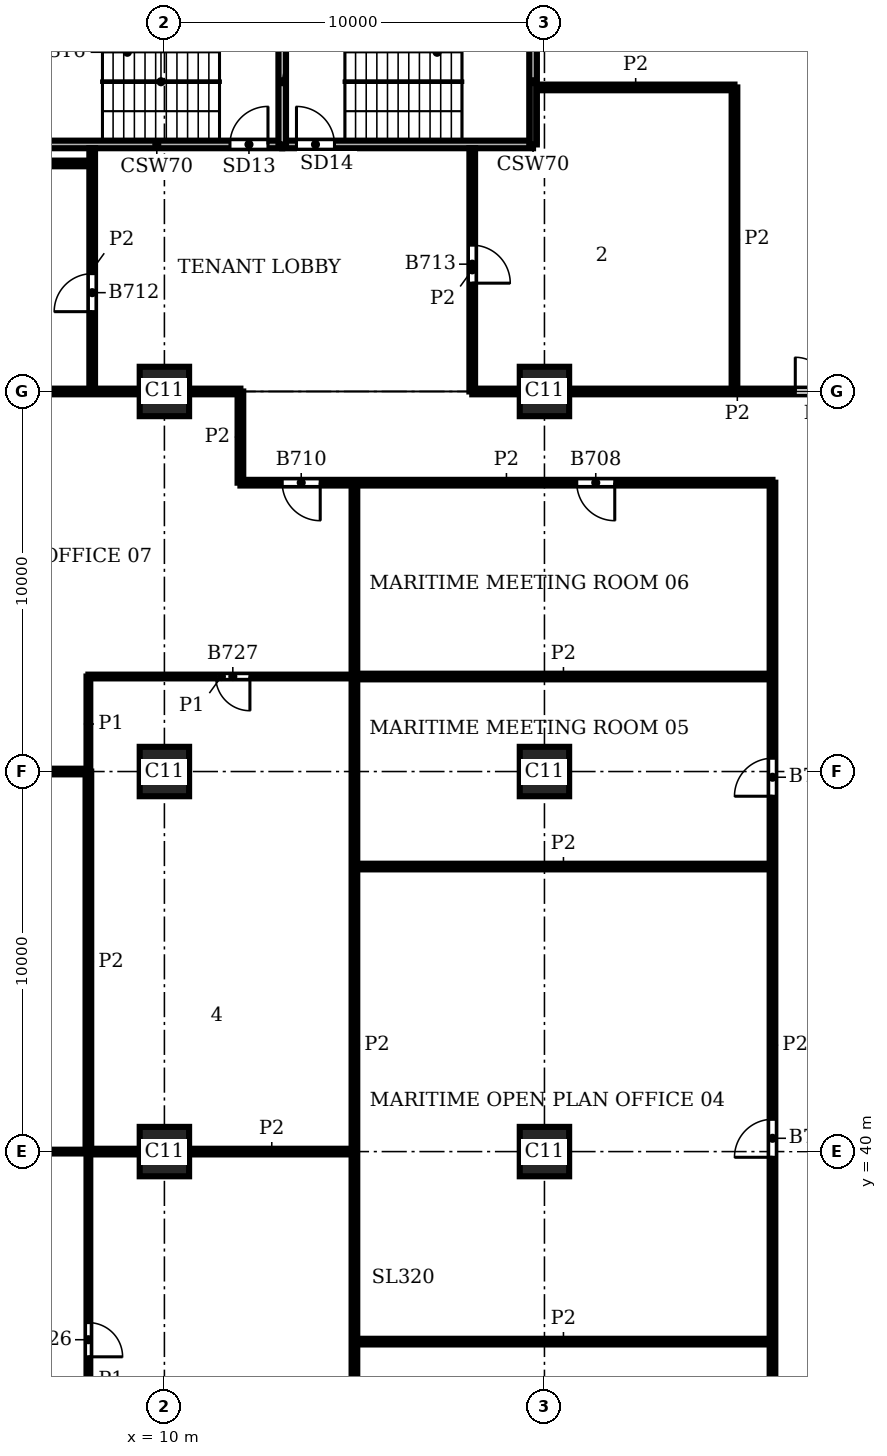
"""IFC4 building model, lengths in metres.
Left out: names, types, materials, properties, quantities, classifications, styles, units other than length and angle.
Written with IfcOpenShell. Run it as: python <this file> out.ifc"""

import sys

from ifc_helpers import new_model, si_unit, direction, frame, frame_2d, origin, origin_2d, place, context, subcontext, project, spatial, rectangle, extrude, element, fill, save


model = new_model("IFC4")
c1 = context("Model", 3, precision=1e-05, world=origin(), true_north=direction((0.0, 1.0)))
c2 = subcontext(c1, "Body", "Model", "MODEL_VIEW")
j1 = project(units=[si_unit("LENGTHUNIT", "METRE"), si_unit("PLANEANGLEUNIT", "RADIAN")], contexts=[c1])
p1 = place(None, origin())
s1 = spatial("IfcSite", under=j1, at=p1, CompositionType="ELEMENT")
p2 = place(p1, origin())
s2 = spatial("IfcBuilding", under=s1, at=p2, CompositionType="ELEMENT")
p3 = place(p2, frame((0.0, 0.0, 201.9)))
s3 = spatial("IfcBuildingStorey", under=s2, at=p3, CompositionType="ELEMENT", Elevation=201.9)
for number, where, z_axis, x_axis in (
    (1, (10.0, 40.0, 0.0), (0.0, 0.0, 1.0), (1.0, 0.0, 0.0)),
    (2, (10.0, 50.0, 0.0), (0.0, 0.0, 1.0), (1.0, 0.0, 0.0)),
    (3, (10.0, 60.0, 0.0), (0.0, 0.0, 1.0), (1.0, 0.0, 0.0)),
    (4, (20.0, 40.0, 0.0), (0.0, 0.0, 1.0), (1.0, 0.0, 0.0)),
    (5, (20.0, 50.0, 0.0), (0.0, 0.0, 1.0), (1.0, 0.0, 0.0)),
    (6, (20.0, 60.0, 0.0), (0.0, 0.0, 1.0), (1.0, 0.0, 0.0)),
):
    element("IfcColumn", number, at=place(p3, frame(where, z_axis=z_axis, x_axis=x_axis)), inside=s3, PredefinedType="COLUMN", context=c2, shape_type="SweptSolid", body=[
        extrude(rectangle(XDim=1.3, YDim=1.3, at=origin_2d()), origin(), (0.0, 0.0, 1.0), 3.9),
    ])
p4 = place(p3, frame((29.357, 66.434, 0.0), z_axis=(0.0, 0.0, 1.0), x_axis=(-0.555541552266, 0.831488775454, 0.0)))
e7 = element("IfcWall", 7, at=p4, inside=s3, PredefinedType="SOLIDWALL", context=c2, shape_type="SweptSolid", body=[
    extrude(rectangle(XDim=4.753, YDim=0.4, at=frame_2d((2.376, 0.0))), origin(), (0.0, 0.0, 1.0), 3.9),
])
p5 = place(p4, frame((0.226, 0.0, 0.9)))
e8 = element("IfcOpeningElement", 8, at=p5, cuts=e7, PredefinedType="OPENING", context=c2, shape_type="SweptSolid", body=[
    extrude(rectangle(XDim=4.3, YDim=2.35, at=frame_2d((2.15, 1.175))), frame((0.0, 0.21, 0.0), z_axis=(0.0, -1.0, 0.0), x_axis=(1.0, 0.0, 0.0)), (0.0, 0.0, 1.0), 0.42),
])
p6 = place(p3, frame((6.5, 66.5, 0.0), z_axis=(0.0, 0.0, 1.0), x_axis=(1.0, 0.0, 0.0)))
e9 = element("IfcWall", 9, at=p6, inside=s3, PredefinedType="SHEAR", context=c2, shape_type="SweptSolid", body=[
    extrude(rectangle(XDim=6.6, YDim=0.2, at=frame_2d((3.3, 0.0))), origin(), (0.0, 0.0, 1.0), 3.58),
])
p7 = place(p6, frame((5.225, 0.0, 0.0)))
e10 = element("IfcOpeningElement", 10, at=p7, cuts=e9, PredefinedType="OPENING", context=c2, shape_type="SweptSolid", body=[
    extrude(rectangle(XDim=1.0, YDim=2.1, at=frame_2d((0.5, 1.05))), frame((0.0, 0.11, 0.0), z_axis=(0.0, -1.0, 0.0), x_axis=(1.0, 0.0, 0.0)), (0.0, 0.0, 1.0), 0.22),
])
p8 = place(p3, frame((13.1, 66.5, 0.0), z_axis=(0.0, 0.0, 1.0), x_axis=(1.0, 0.0, 0.0)))
e11 = element("IfcWall", 11, at=p8, inside=s3, PredefinedType="SHEAR", context=c2, shape_type="SweptSolid", body=[
    extrude(rectangle(XDim=6.6, YDim=0.2, at=frame_2d((3.3, 0.0))), origin(), (0.0, 0.0, 1.0), 3.58),
])
p9 = place(p8, frame((0.375, 0.0, 0.0)))
e12 = element("IfcOpeningElement", 12, at=p9, cuts=e11, PredefinedType="OPENING", context=c2, shape_type="SweptSolid", body=[
    extrude(rectangle(XDim=1.0, YDim=2.1, at=frame_2d((0.5, 1.05))), frame((0.0, 0.11, 0.0), z_axis=(0.0, -1.0, 0.0), x_axis=(1.0, 0.0, 0.0)), (0.0, 0.0, 1.0), 0.22),
])
for number, where, z_axis, x_axis in (
    (13, (13.1, 66.5, 0.0), (0.0, 0.0, 1.0), (0.0, 1.0, 0.0)),
    (14, (19.7, 66.5, 0.0), (0.0, 0.0, 1.0), (0.0, 1.0, 0.0)),
):
    element("IfcWall", number, at=place(p3, frame(where, z_axis=z_axis, x_axis=x_axis)), inside=s3, PredefinedType="SHEAR", context=c2, shape_type="SweptSolid", body=[
        extrude(rectangle(XDim=3.3, YDim=0.2, at=frame_2d((1.65, 0.0))), origin(), (0.0, 0.0, 1.0), 3.58),
    ])
p10 = place(p3, frame((8.0, 28.0, 0.0), z_axis=(0.0, 0.0, 1.0), x_axis=(0.0, 1.0, 0.0)))
e15 = element("IfcWall", 15, at=p10, inside=s3, PredefinedType="PARTITIONING", context=c2, shape_type="SweptSolid", body=[
    extrude(rectangle(XDim=12.0, YDim=0.1, at=frame_2d((6.0, 0.0))), origin(), (0.0, 0.0, 1.0), 3.58),
])
p11 = place(p10, frame((6.6, 0.0, 0.0)))
e16 = element("IfcOpeningElement", 16, at=p11, cuts=e15, PredefinedType="OPENING", context=c2, shape_type="SweptSolid", body=[
    extrude(rectangle(XDim=0.9, YDim=2.1, at=frame_2d((0.45, 1.05))), frame((0.0, 0.06, 0.0), z_axis=(0.0, -1.0, 0.0), x_axis=(1.0, 0.0, 0.0)), (0.0, 0.0, 1.0), 0.12),
])
p12 = place(p3, frame((8.0, 50.0, 0.0), z_axis=(0.0, 0.0, 1.0), x_axis=(0.0, 1.0, 0.0)))
e17 = element("IfcWall", 17, at=p12, inside=s3, PredefinedType="PARTITIONING", context=c2, shape_type="SweptSolid", body=[
    extrude(rectangle(XDim=2.5, YDim=0.1, at=frame_2d((1.25, 0.0))), origin(), (0.0, 0.0, 1.0), 3.58),
])
p13 = place(p3, frame((0.45, 40.0, 0.0), z_axis=(0.0, 0.0, 1.0), x_axis=(1.0, 0.0, 0.0)))
e18 = element("IfcWall", 18, at=p13, inside=s3, PredefinedType="PARTITIONING", context=c2, shape_type="SweptSolid", body=[
    extrude(rectangle(XDim=7.55, YDim=0.1, at=frame_2d((3.775, 0.0))), origin(), (0.0, 0.0, 1.0), 3.58),
])
p14 = place(p13, frame((2.975, 0.0, 0.0)))
e19 = element("IfcOpeningElement", 19, at=p14, cuts=e18, PredefinedType="OPENING", context=c2, shape_type="SweptSolid", body=[
    extrude(rectangle(XDim=0.95, YDim=2.1, at=frame_2d((0.475, 1.05))), frame((0.0, 0.06, 0.0), z_axis=(0.0, -1.0, 0.0), x_axis=(1.0, 0.0, 0.0)), (0.0, 0.0, 1.0), 0.12),
])
p15 = place(p3, frame((8.0, 52.5, 0.0), z_axis=(0.0, 0.0, 1.0), x_axis=(1.0, 0.0, 0.0)))
e20 = element("IfcWall", 20, at=p15, inside=s3, PredefinedType="PARTITIONING", context=c2, shape_type="SweptSolid", body=[
    extrude(rectangle(XDim=7.0, YDim=0.1, at=frame_2d((3.5, 0.0))), origin(), (0.0, 0.0, 1.0), 3.58),
])
p16 = place(p15, frame((3.35, 0.0, 0.0)))
e21 = element("IfcOpeningElement", 21, at=p16, cuts=e20, PredefinedType="OPENING", context=c2, shape_type="SweptSolid", body=[
    extrude(rectangle(XDim=0.9, YDim=2.1, at=frame_2d((0.45, 1.05))), frame((0.0, 0.06, 0.0), z_axis=(0.0, -1.0, 0.0), x_axis=(1.0, 0.0, 0.0)), (0.0, 0.0, 1.0), 0.12),
])
p17 = place(p3, frame((8.0, 40.0, 0.0), z_axis=(0.0, 0.0, 1.0), x_axis=(0.0, 1.0, 0.0)))
e22 = element("IfcWall", 22, at=p17, inside=s3, PredefinedType="PARTITIONING", context=c2, shape_type="SweptSolid", body=[
    extrude(rectangle(XDim=10.0, YDim=0.15, at=frame_2d((5.0, 0.0))), origin(), (0.0, 0.0, 1.0), 3.58),
])
p18 = place(p3, frame((8.1, 60.0, 0.0), z_axis=(0.0, 0.0, 1.0), x_axis=(0.0, 1.0, 0.0)))
e23 = element("IfcWall", 23, at=p18, inside=s3, PredefinedType="PARTITIONING", context=c2, shape_type="SweptSolid", body=[
    extrude(rectangle(XDim=6.4, YDim=0.15, at=frame_2d((3.2, 0.0))), origin(), (0.0, 0.0, 1.0), 3.58),
])
p19 = place(p18, frame((2.1, 0.0, 0.0)))
e24 = element("IfcOpeningElement", 24, at=p19, cuts=e23, PredefinedType="OPENING", context=c2, shape_type="SweptSolid", body=[
    extrude(rectangle(XDim=1.0, YDim=2.1, at=frame_2d((0.5, 1.05))), frame((0.0, 0.085, 0.0), z_axis=(0.0, -1.0, 0.0), x_axis=(1.0, 0.0, 0.0)), (0.0, 0.0, 1.0), 0.17),
])
p20 = place(p3, frame((12.0, 57.6, 0.0), z_axis=(0.0, 0.0, 1.0), x_axis=(0.0, 1.0, 0.0)))
e25 = element("IfcWall", 25, at=p20, inside=s3, PredefinedType="PARTITIONING", context=c2, shape_type="SweptSolid", body=[
    extrude(rectangle(XDim=2.4, YDim=0.15, at=frame_2d((1.2, 0.0))), origin(), (0.0, 0.0, 1.0), 3.58),
])
p21 = place(p3, frame((15.0, 28.0, 0.0), z_axis=(0.0, 0.0, 1.0), x_axis=(0.0, 1.0, 0.0)))
e26 = element("IfcWall", 26, at=p21, inside=s3, PredefinedType="PARTITIONING", context=c2, shape_type="SweptSolid", body=[
    extrude(rectangle(XDim=29.6, YDim=0.15, at=frame_2d((14.8, 0.0))), origin(), (0.0, 0.0, 1.0), 3.58),
])
p22 = place(p3, frame((18.1, 60.0, 0.0), z_axis=(0.0, 0.0, 1.0), x_axis=(0.0, 1.0, 0.0)))
e27 = element("IfcWall", 27, at=p22, inside=s3, PredefinedType="PARTITIONING", context=c2, shape_type="SweptSolid", body=[
    extrude(rectangle(XDim=6.4, YDim=0.15, at=frame_2d((3.2, 0.0))), origin(), (0.0, 0.0, 1.0), 3.58),
])
p23 = place(p22, frame((2.85, 0.0, 0.0)))
e28 = element("IfcOpeningElement", 28, at=p23, cuts=e27, PredefinedType="OPENING", context=c2, shape_type="SweptSolid", body=[
    extrude(rectangle(XDim=1.0, YDim=2.1, at=frame_2d((0.5, 1.05))), frame((0.0, 0.085, 0.0), z_axis=(0.0, -1.0, 0.0), x_axis=(1.0, 0.0, 0.0)), (0.0, 0.0, 1.0), 0.17),
])
p24 = place(p3, frame((25.0, 60.0, 0.0), z_axis=(0.0, 0.0, 1.0), x_axis=(0.0, 1.0, 0.0)))
e29 = element("IfcWall", 29, at=p24, inside=s3, PredefinedType="PARTITIONING", context=c2, shape_type="SweptSolid", body=[
    extrude(rectangle(XDim=8.0, YDim=0.15, at=frame_2d((4.0, 0.0))), origin(), (0.0, 0.0, 1.0), 3.58),
])
p25 = place(p3, frame((26.0, 28.0, 0.0), z_axis=(0.0, 0.0, 1.0), x_axis=(0.0, 1.0, 0.0)))
e30 = element("IfcWall", 30, at=p25, inside=s3, PredefinedType="PARTITIONING", context=c2, shape_type="SweptSolid", body=[
    extrude(rectangle(XDim=29.6, YDim=0.15, at=frame_2d((14.8, 0.0))), origin(), (0.0, 0.0, 1.0), 3.58),
])
p26 = place(p25, frame((3.6, 0.0, 0.0)))
e31 = element("IfcOpeningElement", 31, at=p26, cuts=e30, PredefinedType="OPENING", context=c2, shape_type="SweptSolid", body=[
    extrude(rectangle(XDim=1.0, YDim=2.1, at=frame_2d((0.5, 1.05))), frame((0.0, 0.085, 0.0), z_axis=(0.0, -1.0, 0.0), x_axis=(1.0, 0.0, 0.0)), (0.0, 0.0, 1.0), 0.17),
])
p27 = place(p25, frame((11.85, 0.0, 0.0)))
e32 = element("IfcOpeningElement", 32, at=p27, cuts=e30, PredefinedType="OPENING", context=c2, shape_type="SweptSolid", body=[
    extrude(rectangle(XDim=1.0, YDim=2.1, at=frame_2d((0.5, 1.05))), frame((0.0, 0.085, 0.0), z_axis=(0.0, -1.0, 0.0), x_axis=(1.0, 0.0, 0.0)), (0.0, 0.0, 1.0), 0.17),
])
p28 = place(p25, frame((21.35, 0.0, 0.0)))
e33 = element("IfcOpeningElement", 33, at=p28, cuts=e30, PredefinedType="OPENING", context=c2, shape_type="SweptSolid", body=[
    extrude(rectangle(XDim=1.0, YDim=2.1, at=frame_2d((0.5, 1.05))), frame((0.0, 0.085, 0.0), z_axis=(0.0, -1.0, 0.0), x_axis=(1.0, 0.0, 0.0)), (0.0, 0.0, 1.0), 0.17),
])
p29 = place(p3, frame((15.0, 35.0, 0.0), z_axis=(0.0, 0.0, 1.0), x_axis=(1.0, 0.0, 0.0)))
e34 = element("IfcWall", 34, at=p29, inside=s3, PredefinedType="PARTITIONING", context=c2, shape_type="SweptSolid", body=[
    extrude(rectangle(XDim=11.0, YDim=0.15, at=frame_2d((5.5, 0.0))), origin(), (0.0, 0.0, 1.0), 3.58),
])
p30 = place(p3, frame((8.0, 40.0, 0.0), z_axis=(0.0, 0.0, 1.0), x_axis=(1.0, 0.0, 0.0)))
e35 = element("IfcWall", 35, at=p30, inside=s3, PredefinedType="PARTITIONING", context=c2, shape_type="SweptSolid", body=[
    extrude(rectangle(XDim=1.35, YDim=0.15, at=frame_2d((0.675, 0.0))), origin(), (0.0, 0.0, 1.0), 3.58),
])
p31 = place(p3, frame((10.65, 40.0, 0.0), z_axis=(0.0, 0.0, 1.0), x_axis=(1.0, 0.0, 0.0)))
e36 = element("IfcWall", 36, at=p31, inside=s3, PredefinedType="PARTITIONING", context=c2, shape_type="SweptSolid", body=[
    extrude(rectangle(XDim=4.35, YDim=0.15, at=frame_2d((2.175, 0.0))), origin(), (0.0, 0.0, 1.0), 3.58),
])
p32 = place(p3, frame((15.0, 47.5, 0.0), z_axis=(0.0, 0.0, 1.0), x_axis=(1.0, 0.0, 0.0)))
e37 = element("IfcWall", 37, at=p32, inside=s3, PredefinedType="PARTITIONING", context=c2, shape_type="SweptSolid", body=[
    extrude(rectangle(XDim=11.0, YDim=0.15, at=frame_2d((5.5, 0.0))), origin(), (0.0, 0.0, 1.0), 3.58),
])
p33 = place(p3, frame((0.45, 50.0, 0.0), z_axis=(0.0, 0.0, 1.0), x_axis=(1.0, 0.0, 0.0)))
e38 = element("IfcWall", 38, at=p33, inside=s3, PredefinedType="PARTITIONING", context=c2, shape_type="SweptSolid", body=[
    extrude(rectangle(XDim=7.55, YDim=0.15, at=frame_2d((3.775, 0.0))), origin(), (0.0, 0.0, 1.0), 3.58),
])
p34 = place(p3, frame((15.0, 52.5, 0.0), z_axis=(0.0, 0.0, 1.0), x_axis=(1.0, 0.0, 0.0)))
e39 = element("IfcWall", 39, at=p34, inside=s3, PredefinedType="PARTITIONING", context=c2, shape_type="SweptSolid", body=[
    extrude(rectangle(XDim=11.0, YDim=0.15, at=frame_2d((5.5, 0.0))), origin(), (0.0, 0.0, 1.0), 3.58),
])
p35 = place(p3, frame((12.0, 57.6, 0.0), z_axis=(0.0, 0.0, 1.0), x_axis=(1.0, 0.0, 0.0)))
e40 = element("IfcWall", 40, at=p35, inside=s3, PredefinedType="PARTITIONING", context=c2, shape_type="SweptSolid", body=[
    extrude(rectangle(XDim=14.0, YDim=0.15, at=frame_2d((7.0, 0.0))), origin(), (0.0, 0.0, 1.0), 3.58),
])
p36 = place(p35, frame((8.85, 0.0, 0.0)))
e41 = element("IfcOpeningElement", 41, at=p36, cuts=e40, PredefinedType="OPENING", context=c2, shape_type="SweptSolid", body=[
    extrude(rectangle(XDim=1.0, YDim=2.1, at=frame_2d((0.5, 1.05))), frame((0.0, 0.085, 0.0), z_axis=(0.0, -1.0, 0.0), x_axis=(1.0, 0.0, 0.0)), (0.0, 0.0, 1.0), 0.17),
])
p37 = place(p35, frame((1.1, 0.0, 0.0)))
e42 = element("IfcOpeningElement", 42, at=p37, cuts=e40, PredefinedType="OPENING", context=c2, shape_type="SweptSolid", body=[
    extrude(rectangle(XDim=1.0, YDim=2.1, at=frame_2d((0.5, 1.05))), frame((0.0, 0.085, 0.0), z_axis=(0.0, -1.0, 0.0), x_axis=(1.0, 0.0, 0.0)), (0.0, 0.0, 1.0), 0.17),
])
p38 = place(p3, frame((0.5, 60.0, 0.0), z_axis=(0.0, 0.0, 1.0), x_axis=(1.0, 0.0, 0.0)))
e43 = element("IfcWall", 43, at=p38, inside=s3, PredefinedType="PARTITIONING", context=c2, shape_type="SweptSolid", body=[
    extrude(rectangle(XDim=8.85, YDim=0.15, at=frame_2d((4.425, 0.0))), origin(), (0.0, 0.0, 1.0), 3.58),
])
p39 = place(p3, frame((10.65, 60.0, 0.0), z_axis=(0.0, 0.0, 1.0), x_axis=(1.0, 0.0, 0.0)))
e44 = element("IfcWall", 44, at=p39, inside=s3, PredefinedType="PARTITIONING", context=c2, shape_type="SweptSolid", body=[
    extrude(rectangle(XDim=1.35, YDim=0.15, at=frame_2d((0.675, 0.0))), origin(), (0.0, 0.0, 1.0), 3.58),
])
p40 = place(p3, frame((18.1, 60.0, 0.0), z_axis=(0.0, 0.0, 1.0), x_axis=(1.0, 0.0, 0.0)))
e45 = element("IfcWall", 45, at=p40, inside=s3, PredefinedType="PARTITIONING", context=c2, shape_type="SweptSolid", body=[
    extrude(rectangle(XDim=1.25, YDim=0.15, at=frame_2d((0.625, 0.0))), origin(), (0.0, 0.0, 1.0), 3.58),
])
p41 = place(p3, frame((20.65, 60.0, 0.0), z_axis=(0.0, 0.0, 1.0), x_axis=(1.0, 0.0, 0.0)))
e46 = element("IfcWall", 46, at=p41, inside=s3, PredefinedType="PARTITIONING", context=c2, shape_type="SweptSolid", body=[
    extrude(rectangle(XDim=8.85, YDim=0.15, at=frame_2d((4.425, 0.0))), origin(), (0.0, 0.0, 1.0), 3.58),
])
p42 = place(p41, frame((5.95, 0.0, 0.0)))
e47 = element("IfcOpeningElement", 47, at=p42, cuts=e46, PredefinedType="OPENING", context=c2, shape_type="SweptSolid", body=[
    extrude(rectangle(XDim=1.8, YDim=2.1, at=frame_2d((0.9, 1.05))), frame((0.0, 0.085, 0.0), z_axis=(0.0, -1.0, 0.0), x_axis=(1.0, 0.0, 0.0)), (0.0, 0.0, 1.0), 0.17),
])
p43 = place(p3, frame((0.644, 66.0, 0.0), z_axis=(0.0, 0.0, 1.0), x_axis=(1.0, 0.0, 0.0)))
e48 = element("IfcWall", 48, at=p43, inside=s3, PredefinedType="PARTITIONING", context=c2, shape_type="SweptSolid", body=[
    extrude(rectangle(XDim=7.456, YDim=0.15, at=frame_2d((3.728, 0.0))), origin(), (0.0, 0.0, 1.0), 3.58),
])
p44 = place(p3, frame((19.8, 68.0, 0.0), z_axis=(0.0, 0.0, 1.0), x_axis=(1.0, 0.0, 0.0)))
e49 = element("IfcWall", 49, at=p44, inside=s3, PredefinedType="PARTITIONING", context=c2, shape_type="SweptSolid", body=[
    extrude(rectangle(XDim=5.2, YDim=0.15, at=frame_2d((2.6, 0.0))), origin(), (0.0, 0.0, 1.0), 3.58),
])
p45 = place(p5, origin())
e50 = element("IfcWindow", 50, at=p45, inside=s3, PartitioningType="SINGLE_PANEL", PredefinedType="WINDOW", context=c2, shape_type="SweptSolid", body=[
    extrude(rectangle(XDim=4.3, YDim=2.35, at=frame_2d((2.15, 1.175))), frame((0.0, 0.16, 0.0), z_axis=(0.0, -1.0, 0.0), x_axis=(1.0, 0.0, 0.0)), (0.0, 0.0, 1.0), 0.06),
])
fill(e8, e50)
p46 = place(p7, origin())
e51 = element("IfcDoor", 51, at=p46, inside=s3, OperationType="SINGLE_SWING_RIGHT", PredefinedType="DOOR", context=c2, shape_type="SweptSolid", body=[
    extrude(rectangle(XDim=1.0, YDim=2.1, at=frame_2d((0.5, 1.05))), frame((0.0, 0.025, 0.0), z_axis=(0.0, -1.0, 0.0), x_axis=(1.0, 0.0, 0.0)), (0.0, 0.0, 1.0), 0.05),
])
fill(e10, e51)
p47 = place(p9, origin())
e52 = element("IfcDoor", 52, at=p47, inside=s3, OperationType="SINGLE_SWING_LEFT", PredefinedType="DOOR", context=c2, shape_type="SweptSolid", body=[
    extrude(rectangle(XDim=1.0, YDim=2.1, at=frame_2d((0.5, 1.05))), frame((0.0, 0.025, 0.0), z_axis=(0.0, -1.0, 0.0), x_axis=(1.0, 0.0, 0.0)), (0.0, 0.0, 1.0), 0.05),
])
fill(e12, e52)
p48 = place(p27, origin())
e53 = element("IfcDoor", 53, at=p48, inside=s3, OperationType="SINGLE_SWING_LEFT", PredefinedType="DOOR", context=c2, shape_type="SweptSolid", body=[
    extrude(rectangle(XDim=1.0, YDim=2.1, at=frame_2d((0.5, 1.05))), frame((0.0, 0.025, 0.0), z_axis=(0.0, -1.0, 0.0), x_axis=(1.0, 0.0, 0.0)), (0.0, 0.0, 1.0), 0.05),
])
fill(e32, e53)
p49 = place(p28, origin())
e54 = element("IfcDoor", 54, at=p49, inside=s3, OperationType="SINGLE_SWING_LEFT", PredefinedType="DOOR", context=c2, shape_type="SweptSolid", body=[
    extrude(rectangle(XDim=1.0, YDim=2.1, at=frame_2d((0.5, 1.05))), frame((0.0, 0.025, 0.0), z_axis=(0.0, -1.0, 0.0), x_axis=(1.0, 0.0, 0.0)), (0.0, 0.0, 1.0), 0.05),
])
fill(e33, e54)
p50 = place(p36, frame((1.0, 0.0, 0.0), z_axis=(0.0, 0.0, 1.0), x_axis=(-1.0, 0.0, 0.0)))
e55 = element("IfcDoor", 55, at=p50, inside=s3, OperationType="SINGLE_SWING_LEFT", PredefinedType="DOOR", context=c2, shape_type="SweptSolid", body=[
    extrude(rectangle(XDim=1.0, YDim=2.1, at=frame_2d((0.5, 1.05))), frame((0.0, 0.025, 0.0), z_axis=(0.0, -1.0, 0.0), x_axis=(1.0, 0.0, 0.0)), (0.0, 0.0, 1.0), 0.05),
])
fill(e41, e55)
p51 = place(p37, frame((1.0, 0.0, 0.0), z_axis=(0.0, 0.0, 1.0), x_axis=(-1.0, 0.0, 0.0)))
e56 = element("IfcDoor", 56, at=p51, inside=s3, OperationType="SINGLE_SWING_LEFT", PredefinedType="DOOR", context=c2, shape_type="SweptSolid", body=[
    extrude(rectangle(XDim=1.0, YDim=2.1, at=frame_2d((0.5, 1.05))), frame((0.0, 0.025, 0.0), z_axis=(0.0, -1.0, 0.0), x_axis=(1.0, 0.0, 0.0)), (0.0, 0.0, 1.0), 0.05),
])
fill(e42, e56)
p52 = place(p19, origin())
e57 = element("IfcDoor", 57, at=p52, inside=s3, OperationType="SINGLE_SWING_LEFT", PredefinedType="DOOR", context=c2, shape_type="SweptSolid", body=[
    extrude(rectangle(XDim=1.0, YDim=2.1, at=frame_2d((0.5, 1.05))), frame((0.0, 0.025, 0.0), z_axis=(0.0, -1.0, 0.0), x_axis=(1.0, 0.0, 0.0)), (0.0, 0.0, 1.0), 0.05),
])
fill(e24, e57)
p53 = place(p23, frame((1.0, 0.0, 0.0), z_axis=(0.0, 0.0, 1.0), x_axis=(-1.0, 0.0, 0.0)))
e58 = element("IfcDoor", 58, at=p53, inside=s3, OperationType="SINGLE_SWING_RIGHT", PredefinedType="DOOR", context=c2, shape_type="SweptSolid", body=[
    extrude(rectangle(XDim=1.0, YDim=2.1, at=frame_2d((0.5, 1.05))), frame((0.0, 0.025, 0.0), z_axis=(0.0, -1.0, 0.0), x_axis=(1.0, 0.0, 0.0)), (0.0, 0.0, 1.0), 0.05),
])
fill(e28, e58)
p54 = place(p42, origin())
e59 = element("IfcDoor", 59, at=p54, inside=s3, OperationType="DOUBLE_DOOR_SINGLE_SWING", PredefinedType="DOOR", context=c2, shape_type="SweptSolid", body=[
    extrude(rectangle(XDim=1.8, YDim=2.1, at=frame_2d((0.9, 1.05))), frame((0.0, 0.025, 0.0), z_axis=(0.0, -1.0, 0.0), x_axis=(1.0, 0.0, 0.0)), (0.0, 0.0, 1.0), 0.05),
])
fill(e47, e59)
p55 = place(p11, frame((0.9, 0.0, 0.0), z_axis=(0.0, 0.0, 1.0), x_axis=(-1.0, 0.0, 0.0)))
e60 = element("IfcDoor", 60, at=p55, inside=s3, OperationType="SINGLE_SWING_RIGHT", PredefinedType="DOOR", context=c2, shape_type="SweptSolid", body=[
    extrude(rectangle(XDim=0.9, YDim=2.1, at=frame_2d((0.45, 1.05))), frame((0.0, 0.025, 0.0), z_axis=(0.0, -1.0, 0.0), x_axis=(1.0, 0.0, 0.0)), (0.0, 0.0, 1.0), 0.05),
])
fill(e16, e60)
p56 = place(p16, frame((0.9, 0.0, 0.0), z_axis=(0.0, 0.0, 1.0), x_axis=(-1.0, 0.0, 0.0)))
e61 = element("IfcDoor", 61, at=p56, inside=s3, OperationType="SINGLE_SWING_LEFT", PredefinedType="DOOR", context=c2, shape_type="SweptSolid", body=[
    extrude(rectangle(XDim=0.9, YDim=2.1, at=frame_2d((0.45, 1.05))), frame((0.0, 0.025, 0.0), z_axis=(0.0, -1.0, 0.0), x_axis=(1.0, 0.0, 0.0)), (0.0, 0.0, 1.0), 0.05),
])
fill(e21, e61)
save(model, sys.argv[1])
